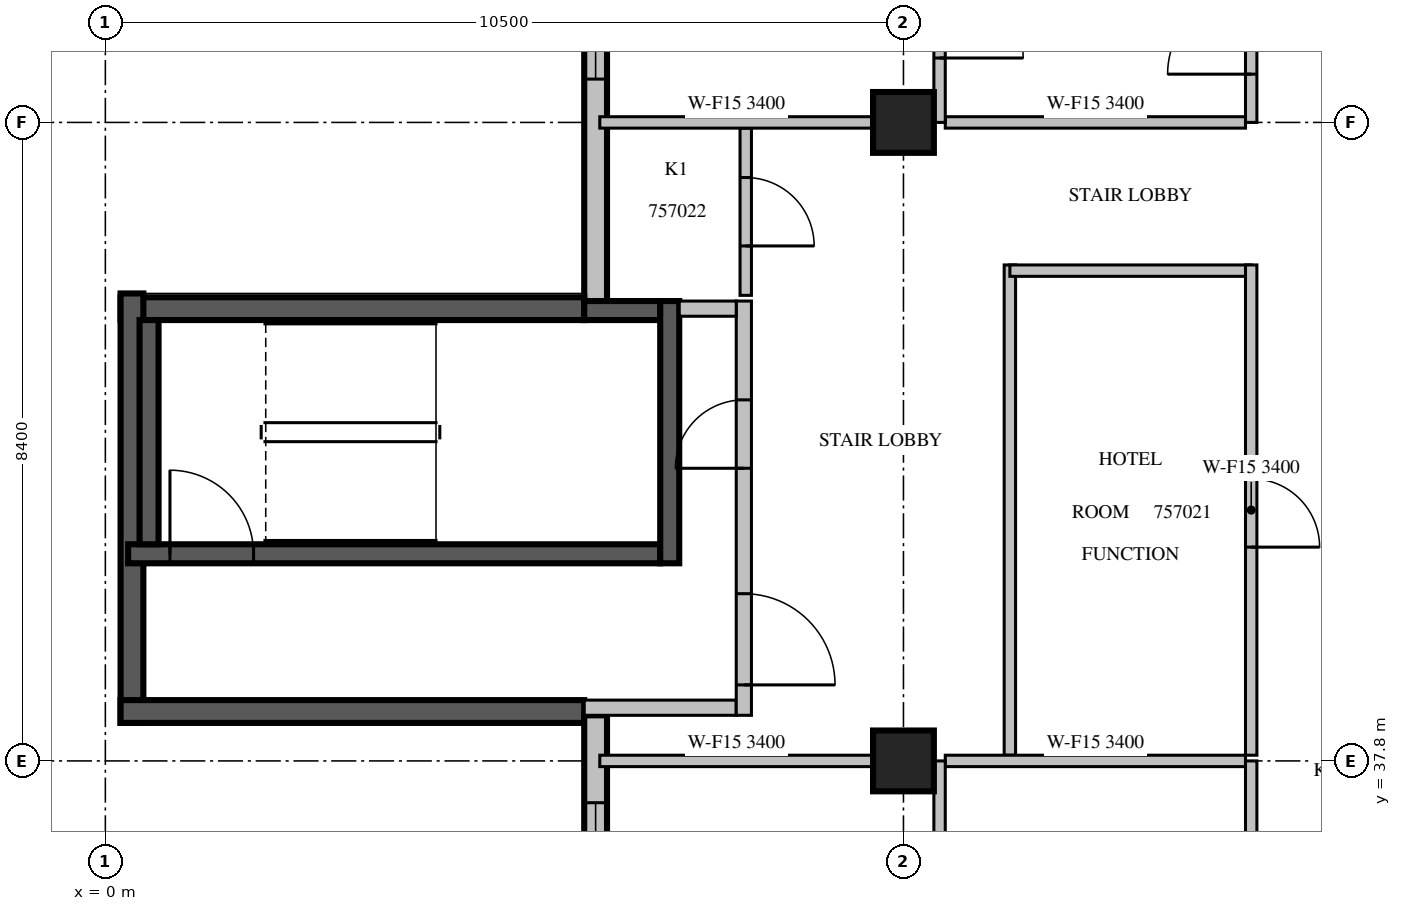
"""IFC4 building model, lengths in metres.
Left out: names, types, materials, properties, quantities, classifications, styles, units other than length and angle.
Written with IfcOpenShell. Run it as: python <this file> out.ifc"""

import sys

from ifc_helpers import new_model, si_unit, direction, frame, frame_2d, origin, origin_2d, place, context, subcontext, project, spatial, rectangle, extrude, source, transform, mapped, element, fill, save


model = new_model("IFC4")
c1 = context("Model", 3, precision=1e-05, world=origin(), true_north=direction((0.0, 1.0)))
c2 = subcontext(c1, "Body", "Model", "MODEL_VIEW")
j1 = project(units=[si_unit("LENGTHUNIT", "METRE"), si_unit("PLANEANGLEUNIT", "RADIAN")], contexts=[c1])
p1 = place(None, origin())
s1 = spatial("IfcSite", under=j1, at=p1, CompositionType="ELEMENT")
p2 = place(p1, origin())
s2 = spatial("IfcBuilding", under=s1, at=p2, CompositionType="ELEMENT")
p3 = place(p2, frame((0.0, 0.0, 250.0)))
s3 = spatial("IfcBuildingStorey", under=s2, at=p3, CompositionType="ELEMENT", Elevation=250.0)
m1 = source(origin(), c2, "Body", "SweptSolid", [
    extrude(rectangle(XDim=0.8, YDim=0.8, at=origin_2d()), origin(), (0.0, 0.0, 1.0), 3.8),
])
for number, where, z_axis, x_axis in (
    (1, (10.5, 37.8, 0.0), (0.0, 0.0, 1.0), (1.0, 0.0, 0.0)),
    (2, (10.5, 46.2, 0.0), (0.0, 0.0, 1.0), (1.0, 0.0, 0.0)),
):
    element("IfcColumn", number, at=place(p3, frame(where, z_axis=z_axis, x_axis=x_axis)), inside=s3, PredefinedType="COLUMN", context=c2, shape_type="MappedRepresentation", body=[
        mapped(m1, transform((0.0, 0.0, 0.0), scale=1.0)),
    ])
m2 = source(origin(), c2, "Body", "SweptSolid", [
    extrude(rectangle(XDim=9.91, YDim=0.3, at=frame_2d((4.955, 0.0))), origin(), (0.0, 0.0, 1.0), 3.4),
])
p4 = place(p3, frame((6.45, 53.76, 0.0), z_axis=(0.0, 0.0, 1.0), x_axis=(0.0, -1.0, 0.0)))
e3 = element("IfcWall", 3, at=p4, inside=s3, PredefinedType="STANDARD", context=c2, shape_type="MappedRepresentation", body=[
    mapped(m2, transform((0.0, 0.0, 0.0), scale=1.0)),
])
m3 = source(origin(), c2, "Body", "SweptSolid", [
    extrude(rectangle(XDim=3.6, YDim=2.3, at=frame_2d((1.8, 1.15))), frame((0.0, 0.16, 0.0), z_axis=(0.0, -1.0, 0.0), x_axis=(1.0, 0.0, 0.0)), (0.0, 0.0, 1.0), 0.32),
])
p5 = place(p4, frame((3.39, 0.0, 0.6)))
e4 = element("IfcOpeningElement", 4, at=p5, cuts=e3, PredefinedType="OPENING", context=c2, shape_type="MappedRepresentation", body=[
    mapped(m3, transform((0.0, 0.0, 0.0), scale=1.0)),
])
m4 = source(origin(), c2, "Body", "SweptSolid", [
    extrude(rectangle(XDim=2.4, YDim=2.3, at=frame_2d((1.2, 1.15))), frame((0.0, 0.16, 0.0), z_axis=(0.0, -1.0, 0.0), x_axis=(1.0, 0.0, 0.0)), (0.0, 0.0, 1.0), 0.32),
])
p6 = place(p4, frame((0.495, 0.0, 0.6)))
e5 = element("IfcOpeningElement", 5, at=p6, cuts=e3, PredefinedType="OPENING", context=c2, shape_type="MappedRepresentation", body=[
    mapped(m4, transform((0.0, 0.0, 0.0), scale=1.0)),
])
m5 = source(origin(), c2, "Body", "SweptSolid", [
    extrude(rectangle(XDim=6.1, YDim=0.3, at=frame_2d((3.05, 0.0))), origin(), (0.0, 0.0, 1.0), 3.4),
])
p7 = place(p3, frame((6.3, 43.75, 0.0), z_axis=(0.0, 0.0, 1.0), x_axis=(-1.0, 0.0, 0.0)))
e6 = element("IfcWall", 6, at=p7, inside=s3, PredefinedType="SOLIDWALL", context=c2, shape_type="MappedRepresentation", body=[
    mapped(m5, transform((0.0, 0.0, 0.0), scale=1.0)),
])
m6 = source(origin(), c2, "Body", "SweptSolid", [
    extrude(rectangle(XDim=5.65, YDim=0.3, at=frame_2d((2.825, 0.0))), origin(), (0.0, 0.0, 1.0), 3.4),
])
p8 = place(p3, frame((0.35, 43.95, 0.0), z_axis=(0.0, 0.0, 1.0), x_axis=(0.0, -1.0, 0.0)))
e7 = element("IfcWall", 7, at=p8, inside=s3, PredefinedType="SOLIDWALL", context=c2, shape_type="MappedRepresentation", body=[
    mapped(m6, transform((0.0, 0.0, 0.0), scale=1.0)),
])
p9 = place(p3, frame((0.2, 38.45, 0.0), z_axis=(0.0, 0.0, 1.0), x_axis=(1.0, 0.0, 0.0)))
e8 = element("IfcWall", 8, at=p9, inside=s3, PredefinedType="SOLIDWALL", context=c2, shape_type="MappedRepresentation", body=[
    mapped(m5, transform((0.0, 0.0, 0.0), scale=1.0)),
])
m7 = source(origin(), c2, "Body", "SweptSolid", [
    extrude(rectangle(XDim=16.6, YDim=0.3, at=frame_2d((8.3, 0.0))), origin(), (0.0, 0.0, 1.0), 2.9),
])
p10 = place(p3, frame((6.45, 38.4, 0.0), z_axis=(0.0, 0.0, 1.0), x_axis=(0.0, -1.0, 0.0)))
e9 = element("IfcWall", 9, at=p10, inside=s3, PredefinedType="STANDARD", context=c2, shape_type="MappedRepresentation", body=[
    mapped(m7, transform((0.0, 0.0, 0.0), scale=1.0)),
])
m8 = source(origin(), c2, "Body", "SweptSolid", [
    extrude(rectangle(XDim=1.8, YDim=2.3, at=frame_2d((0.9, 1.15))), frame((0.0, 0.16, 0.0), z_axis=(0.0, -1.0, 0.0), x_axis=(1.0, 0.0, 0.0)), (0.0, 0.0, 1.0), 0.32),
])
p11 = place(p10, frame((1.15, 0.0, 0.6)))
e10 = element("IfcOpeningElement", 10, at=p11, cuts=e9, PredefinedType="OPENING", context=c2, shape_type="MappedRepresentation", body=[
    mapped(m8, transform((0.0, 0.0, 0.0), scale=1.0)),
])
p12 = place(p10, frame((4.75, 0.0, 0.6)))
e11 = element("IfcOpeningElement", 11, at=p12, cuts=e9, PredefinedType="OPENING", context=c2, shape_type="MappedRepresentation", body=[
    mapped(m4, transform((0.0, 0.0, 0.0), scale=1.0)),
])
p13 = place(p10, frame((9.438, 0.0, 0.6)))
e12 = element("IfcOpeningElement", 12, at=p13, cuts=e9, PredefinedType="OPENING", context=c2, shape_type="MappedRepresentation", body=[
    mapped(m8, transform((0.0, 0.0, 0.0), scale=1.0)),
])
m9 = source(origin(), c2, "Body", "SweptSolid", [
    extrude(rectangle(XDim=3.0, YDim=2.3, at=frame_2d((1.5, 1.15))), frame((0.0, 0.16, 0.0), z_axis=(0.0, -1.0, 0.0), x_axis=(1.0, 0.0, 0.0)), (0.0, 0.0, 1.0), 0.32),
])
p14 = place(p10, frame((12.7, 0.0, 0.6)))
e13 = element("IfcOpeningElement", 13, at=p14, cuts=e9, PredefinedType="OPENING", context=c2, shape_type="MappedRepresentation", body=[
    mapped(m9, transform((0.0, 0.0, 0.0), scale=1.0)),
])
m10 = source(origin(), c2, "Body", "SweptSolid", [
    extrude(rectangle(XDim=7.0, YDim=0.25, at=frame_2d((3.5, 0.0))), origin(), (0.0, 0.0, 1.0), 3.4),
])
p15 = place(p3, frame((0.3, 40.525, 0.0), z_axis=(0.0, 0.0, 1.0), x_axis=(1.0, 0.0, 0.0)))
e14 = element("IfcWall", 14, at=p15, inside=s3, PredefinedType="SOLIDWALL", context=c2, shape_type="MappedRepresentation", body=[
    mapped(m10, transform((0.0, 0.0, 0.0), scale=1.0)),
])
m11 = source(origin(), c2, "Body", "SweptSolid", [
    extrude(rectangle(XDim=1.1, YDim=2.1, at=frame_2d((0.55, 1.05))), frame((0.0, 0.135, 0.0), z_axis=(0.0, -1.0, 0.0), x_axis=(1.0, 0.0, 0.0)), (0.0, 0.0, 1.0), 0.27),
])
p16 = place(p15, frame((0.55, 0.0, 0.0)))
e15 = element("IfcOpeningElement", 15, at=p16, cuts=e14, PredefinedType="OPENING", context=c2, shape_type="MappedRepresentation", body=[
    mapped(m11, transform((0.0, 0.0, 0.0), scale=1.0)),
])
m12 = source(origin(), c2, "Body", "SweptSolid", [
    extrude(rectangle(XDim=1.0, YDim=0.25, at=frame_2d((0.5, 0.0))), origin(), (0.0, 0.0, 1.0), 3.4),
])
p17 = place(p3, frame((6.3, 43.725, 0.0), z_axis=(0.0, 0.0, 1.0), x_axis=(1.0, 0.0, 0.0)))
e16 = element("IfcWall", 16, at=p17, inside=s3, PredefinedType="SOLIDWALL", context=c2, shape_type="MappedRepresentation", body=[
    mapped(m12, transform((0.0, 0.0, 0.0), scale=1.0)),
])
m13 = source(origin(), c2, "Body", "SweptSolid", [
    extrude(rectangle(XDim=3.45, YDim=0.25, at=frame_2d((1.725, 0.0))), origin(), (0.0, 0.0, 1.0), 3.4),
])
p18 = place(p3, frame((7.425, 40.4, 0.0), z_axis=(0.0, 0.0, 1.0), x_axis=(0.0, 1.0, 0.0)))
e17 = element("IfcWall", 17, at=p18, inside=s3, PredefinedType="SOLIDWALL", context=c2, shape_type="MappedRepresentation", body=[
    mapped(m13, transform((0.0, 0.0, 0.0), scale=1.0)),
])
m14 = source(origin(), c2, "Body", "SweptSolid", [
    extrude(rectangle(XDim=2.95, YDim=0.25, at=frame_2d((1.475, 0.0))), origin(), (0.0, 0.0, 1.0), 3.4),
])
p19 = place(p3, frame((0.575, 40.65, 0.0), z_axis=(0.0, 0.0, 1.0), x_axis=(0.0, 1.0, 0.0)))
e18 = element("IfcWall", 18, at=p19, inside=s3, PredefinedType="SOLIDWALL", context=c2, shape_type="MappedRepresentation", body=[
    mapped(m14, transform((0.0, 0.0, 0.0), scale=1.0)),
])
m15 = source(origin(), c2, "Body", "SweptSolid", [
    extrude(rectangle(XDim=2.0, YDim=0.2, at=frame_2d((1.0, 0.0))), origin(), (0.0, 0.0, 1.0), 3.4),
])
p20 = place(p3, frame((6.3, 38.5, 0.0), z_axis=(0.0, 0.0, 1.0), x_axis=(1.0, 0.0, 0.0)))
e19 = element("IfcWall", 19, at=p20, inside=s3, PredefinedType="PARTITIONING", context=c2, shape_type="MappedRepresentation", body=[
    mapped(m15, transform((0.0, 0.0, 0.0), scale=1.0)),
])
m16 = source(origin(), c2, "Body", "SweptSolid", [
    extrude(rectangle(XDim=5.45, YDim=0.2, at=frame_2d((2.725, 0.0))), origin(), (0.0, 0.0, 1.0), 3.4),
])
p21 = place(p3, frame((8.4, 38.4, 0.0), z_axis=(0.0, 0.0, 1.0), x_axis=(0.0, 1.0, 0.0)))
e20 = element("IfcWall", 20, at=p21, inside=s3, PredefinedType="PARTITIONING", context=c2, shape_type="MappedRepresentation", body=[
    mapped(m16, transform((0.0, 0.0, 0.0), scale=1.0)),
])
m17 = source(origin(), c2, "Body", "SweptSolid", [
    extrude(rectangle(XDim=1.2, YDim=2.1, at=frame_2d((0.6, 1.05))), frame((0.0, 0.11, 0.0), z_axis=(0.0, -1.0, 0.0), x_axis=(1.0, 0.0, 0.0)), (0.0, 0.0, 1.0), 0.22),
])
p22 = place(p21, frame((0.4, 0.0, 0.0)))
e21 = element("IfcOpeningElement", 21, at=p22, cuts=e20, PredefinedType="OPENING", context=c2, shape_type="MappedRepresentation", body=[
    mapped(m17, transform((0.0, 0.0, 0.0), scale=1.0)),
])
m18 = source(origin(), c2, "Body", "SweptSolid", [
    extrude(rectangle(XDim=0.9, YDim=2.1, at=frame_2d((0.45, 1.05))), frame((0.0, 0.11, 0.0), z_axis=(0.0, -1.0, 0.0), x_axis=(1.0, 0.0, 0.0)), (0.0, 0.0, 1.0), 0.22),
])
p23 = place(p21, frame((3.25, 0.0, 0.0)))
e22 = element("IfcOpeningElement", 22, at=p23, cuts=e20, PredefinedType="OPENING", context=c2, shape_type="MappedRepresentation", body=[
    mapped(m18, transform((0.0, 0.0, 0.0), scale=1.0)),
])
m19 = source(origin(), c2, "Body", "SweptSolid", [
    extrude(rectangle(XDim=0.75, YDim=0.2, at=frame_2d((0.375, 0.0))), origin(), (0.0, 0.0, 1.0), 3.4),
])
p24 = place(p3, frame((7.55, 43.75, 0.0), z_axis=(0.0, 0.0, 1.0), x_axis=(1.0, 0.0, 0.0)))
e23 = element("IfcWall", 23, at=p24, inside=s3, PredefinedType="PARTITIONING", context=c2, shape_type="MappedRepresentation", body=[
    mapped(m19, transform((0.0, 0.0, 0.0), scale=1.0)),
])
m20 = source(origin(), c2, "Body", "SweptSolid", [
    extrude(rectangle(XDim=6.45, YDim=0.15, at=frame_2d((3.225, 0.0))), origin(), (0.0, 0.0, 1.0), 3.4),
])
p25 = place(p3, frame((11.9, 44.325, 0.0), z_axis=(0.0, 0.0, 1.0), x_axis=(0.0, -1.0, 0.0)))
e24 = element("IfcWall", 24, at=p25, inside=s3, PredefinedType="PARTITIONING", context=c2, shape_type="MappedRepresentation", body=[
    mapped(m20, transform((0.0, 0.0, 0.0), scale=1.0)),
])
m21 = source(origin(), c2, "Body", "SweptSolid", [
    extrude(rectangle(XDim=3.175, YDim=0.15, at=frame_2d((1.587, 0.0))), origin(), (0.0, 0.0, 1.0), 3.4),
])
p26 = place(p3, frame((15.075, 44.25, 0.0), z_axis=(0.0, 0.0, 1.0), x_axis=(-1.0, 0.0, 0.0)))
e25 = element("IfcWall", 25, at=p26, inside=s3, PredefinedType="PARTITIONING", context=c2, shape_type="MappedRepresentation", body=[
    mapped(m21, transform((0.0, 0.0, 0.0), scale=1.0)),
])
p27 = place(p3, frame((15.075, 37.875, 0.0), z_axis=(0.0, 0.0, 1.0), x_axis=(0.0, 1.0, 0.0)))
e26 = element("IfcWall", 26, at=p27, inside=s3, PredefinedType="PARTITIONING", context=c2, shape_type="MappedRepresentation", body=[
    mapped(m20, transform((0.0, 0.0, 0.0), scale=1.0)),
])
m22 = source(origin(), c2, "Body", "SweptSolid", [
    extrude(rectangle(XDim=0.9, YDim=2.1, at=frame_2d((0.45, 1.05))), frame((0.0, 0.085, 0.0), z_axis=(0.0, -1.0, 0.0), x_axis=(1.0, 0.0, 0.0)), (0.0, 0.0, 1.0), 0.17),
])
p28 = place(p27, frame((2.737, 0.0, 0.0)))
e27 = element("IfcOpeningElement", 27, at=p28, cuts=e26, PredefinedType="OPENING", context=c2, shape_type="MappedRepresentation", body=[
    mapped(m22, transform((0.0, 0.0, 0.0), scale=1.0)),
])
m23 = source(origin(), c2, "Body", "SweptSolid", [
    extrude(rectangle(XDim=2.2, YDim=0.15, at=frame_2d((1.1, 0.0))), origin(), (0.0, 0.0, 1.0), 3.4),
])
p29 = place(p3, frame((8.425, 43.925, 0.0), z_axis=(0.0, 0.0, 1.0), x_axis=(0.0, 1.0, 0.0)))
e28 = element("IfcWall", 28, at=p29, inside=s3, PredefinedType="PARTITIONING", context=c2, shape_type="MappedRepresentation", body=[
    mapped(m23, transform((0.0, 0.0, 0.0), scale=1.0)),
])
p30 = place(p29, frame((0.65, 0.0, 0.0)))
e29 = element("IfcOpeningElement", 29, at=p30, cuts=e28, PredefinedType="OPENING", context=c2, shape_type="MappedRepresentation", body=[
    mapped(m22, transform((0.0, 0.0, 0.0), scale=1.0)),
])
m24 = source(origin(), c2, "Body", "SweptSolid", [
    extrude(rectangle(XDim=3.596, YDim=0.15, at=frame_2d((1.798, 0.0))), origin(), (0.0, 0.0, 1.0), 3.4),
])
p31 = place(p3, frame((10.101, 37.8, 0.0), z_axis=(0.0, 0.0, 1.0), x_axis=(-1.0, 0.0, 0.0)))
e30 = element("IfcWall", 30, at=p31, inside=s3, PredefinedType="PARTITIONING", context=c2, shape_type="MappedRepresentation", body=[
    mapped(m24, transform((0.0, 0.0, 0.0), scale=1.0)),
])
m25 = source(origin(), c2, "Body", "SweptSolid", [
    extrude(rectangle(XDim=3.95, YDim=0.15, at=frame_2d((1.975, 0.0))), origin(), (0.0, 0.0, 1.0), 3.4),
])
p32 = place(p3, frame((15.0, 37.8, 0.0), z_axis=(0.0, 0.0, 1.0), x_axis=(-1.0, 0.0, 0.0)))
e31 = element("IfcWall", 31, at=p32, inside=s3, PredefinedType="PARTITIONING", context=c2, shape_type="MappedRepresentation", body=[
    mapped(m25, transform((0.0, 0.0, 0.0), scale=1.0)),
])
m26 = source(origin(), c2, "Body", "SweptSolid", [
    extrude(rectangle(XDim=8.4, YDim=0.15, at=frame_2d((4.2, 0.0))), origin(), (0.0, 0.0, 1.0), 2.9),
])
p33 = place(p3, frame((10.975, 29.4, 0.0), z_axis=(0.0, 0.0, 1.0), x_axis=(0.0, 1.0, 0.0)))
e32 = element("IfcWall", 32, at=p33, inside=s3, PredefinedType="PARTITIONING", context=c2, shape_type="MappedRepresentation", body=[
    mapped(m26, transform((0.0, 0.0, 0.0), scale=1.0)),
])
p34 = place(p33, frame((0.408, 0.0, 0.0)))
e33 = element("IfcOpeningElement", 33, at=p34, cuts=e32, PredefinedType="OPENING", context=c2, shape_type="MappedRepresentation", body=[
    mapped(m22, transform((0.0, 0.0, 0.0), scale=1.0)),
])
p35 = place(p33, frame((2.328, 0.0, 0.0)))
e34 = element("IfcOpeningElement", 34, at=p35, cuts=e32, PredefinedType="OPENING", context=c2, shape_type="MappedRepresentation", body=[
    mapped(m22, transform((0.0, 0.0, 0.0), scale=1.0)),
])
p36 = place(p3, frame((10.101, 46.2, 0.0), z_axis=(0.0, 0.0, 1.0), x_axis=(-1.0, 0.0, 0.0)))
e35 = element("IfcWall", 35, at=p36, inside=s3, PredefinedType="PARTITIONING", context=c2, shape_type="MappedRepresentation", body=[
    mapped(m24, transform((0.0, 0.0, 0.0), scale=1.0)),
])
p37 = place(p3, frame((15.0, 46.2, 0.0), z_axis=(0.0, 0.0, 1.0), x_axis=(-1.0, 0.0, 0.0)))
e36 = element("IfcWall", 36, at=p37, inside=s3, PredefinedType="PARTITIONING", context=c2, shape_type="MappedRepresentation", body=[
    mapped(m25, transform((0.0, 0.0, 0.0), scale=1.0)),
])
m27 = source(origin(), c2, "Body", "SweptSolid", [
    extrude(rectangle(XDim=7.26, YDim=0.15, at=frame_2d((3.63, 0.0))), origin(), (0.0, 0.0, 1.0), 3.4),
])
p38 = place(p3, frame((10.975, 46.2, 0.0), z_axis=(0.0, 0.0, 1.0), x_axis=(0.0, 1.0, 0.0)))
e37 = element("IfcWall", 37, at=p38, inside=s3, PredefinedType="PARTITIONING", context=c2, shape_type="MappedRepresentation", body=[
    mapped(m27, transform((0.0, 0.0, 0.0), scale=1.0)),
])
m28 = source(origin(), c2, "Body", "SweptSolid", [
    extrude(rectangle(XDim=1.1, YDim=2.1, at=frame_2d((0.55, 1.05))), frame((0.0, 0.085, 0.0), z_axis=(0.0, -1.0, 0.0), x_axis=(1.0, 0.0, 0.0)), (0.0, 0.0, 1.0), 0.17),
])
p39 = place(p38, frame((0.847, 0.0, 0.0)))
e38 = element("IfcOpeningElement", 38, at=p39, cuts=e37, PredefinedType="OPENING", context=c2, shape_type="MappedRepresentation", body=[
    mapped(m28, transform((0.0, 0.0, 0.0), scale=1.0)),
])
p40 = place(p38, frame((2.946, 0.0, 0.0)))
e39 = element("IfcOpeningElement", 39, at=p40, cuts=e37, PredefinedType="OPENING", context=c2, shape_type="MappedRepresentation", body=[
    mapped(m22, transform((0.0, 0.0, 0.0), scale=1.0)),
])
p41 = place(p38, frame((4.529, 0.0, 0.0)))
e40 = element("IfcOpeningElement", 40, at=p41, cuts=e37, PredefinedType="OPENING", context=c2, shape_type="MappedRepresentation", body=[
    mapped(m22, transform((0.0, 0.0, 0.0), scale=1.0)),
])
p42 = place(p3, frame((15.075, 29.4, 0.0), z_axis=(0.0, 0.0, 1.0), x_axis=(0.0, 1.0, 0.0)))
e41 = element("IfcWall", 41, at=p42, inside=s3, PredefinedType="PARTITIONING", context=c2, shape_type="MappedRepresentation", body=[
    mapped(m26, transform((0.0, 0.0, 0.0), scale=1.0)),
])
m29 = source(origin(), c2, "Body", "SweptSolid", [
    extrude(rectangle(XDim=1.0, YDim=2.1, at=frame_2d((0.5, 1.05))), frame((0.0, 0.085, 0.0), z_axis=(0.0, -1.0, 0.0), x_axis=(1.0, 0.0, 0.0)), (0.0, 0.0, 1.0), 0.17),
])
p43 = place(p42, frame((0.245, 0.0, 0.0)))
e42 = element("IfcOpeningElement", 42, at=p43, cuts=e41, PredefinedType="OPENING", context=c2, shape_type="MappedRepresentation", body=[
    mapped(m29, transform((0.0, 0.0, 0.0), scale=1.0)),
])
p44 = place(p42, frame((5.733, 0.0, 0.0)))
e43 = element("IfcOpeningElement", 43, at=p44, cuts=e41, PredefinedType="OPENING", context=c2, shape_type="MappedRepresentation", body=[
    mapped(m22, transform((0.0, 0.0, 0.0), scale=1.0)),
])
p45 = place(p3, frame((15.075, 46.2, 0.0), z_axis=(0.0, 0.0, 1.0), x_axis=(0.0, 1.0, 0.0)))
e44 = element("IfcWall", 44, at=p45, inside=s3, PredefinedType="PARTITIONING", context=c2, shape_type="MappedRepresentation", body=[
    mapped(m27, transform((0.0, 0.0, 0.0), scale=1.0)),
])
p46 = place(p45, frame((0.635, 0.0, 0.0)))
e45 = element("IfcOpeningElement", 45, at=p46, cuts=e44, PredefinedType="OPENING", context=c2, shape_type="MappedRepresentation", body=[
    mapped(m28, transform((0.0, 0.0, 0.0), scale=1.0)),
])
m30 = source(origin(), c2, "Body", "SweptSolid", [
    extrude(rectangle(XDim=3.6, YDim=2.3, at=frame_2d((1.8, 1.15))), frame((0.0, 0.03, 0.0), z_axis=(0.0, -1.0, 0.0), x_axis=(1.0, 0.0, 0.0)), (0.0, 0.0, 1.0), 0.06),
])
p47 = place(p5, origin())
e46 = element("IfcWindow", 46, at=p47, inside=s3, PartitioningType="SINGLE_PANEL", PredefinedType="WINDOW", context=c2, shape_type="MappedRepresentation", body=[
    mapped(m30, transform((0.0, 0.0, 0.0), scale=1.0)),
])
fill(e4, e46)
m31 = source(origin(), c2, "Body", "SweptSolid", [
    extrude(rectangle(XDim=1.8, YDim=2.3, at=frame_2d((0.9, 1.15))), frame((0.0, 0.03, 0.0), z_axis=(0.0, -1.0, 0.0), x_axis=(1.0, 0.0, 0.0)), (0.0, 0.0, 1.0), 0.06),
])
p48 = place(p11, origin())
e47 = element("IfcWindow", 47, at=p48, inside=s3, PartitioningType="SINGLE_PANEL", PredefinedType="WINDOW", context=c2, shape_type="MappedRepresentation", body=[
    mapped(m31, transform((0.0, 0.0, 0.0), scale=1.0)),
])
fill(e10, e47)
m32 = source(origin(), c2, "Body", "SweptSolid", [
    extrude(rectangle(XDim=1.1, YDim=2.1, at=frame_2d((0.55, 1.05))), frame((0.0, 0.025, 0.0), z_axis=(0.0, -1.0, 0.0), x_axis=(1.0, 0.0, 0.0)), (0.0, 0.0, 1.0), 0.05),
])
p49 = place(p16, origin())
e48 = element("IfcDoor", 48, at=p49, inside=s3, OperationType="SINGLE_SWING_LEFT", PredefinedType="DOOR", context=c2, shape_type="MappedRepresentation", body=[
    mapped(m32, transform((0.0, 0.0, 0.0), scale=1.0)),
])
fill(e15, e48)
m33 = source(origin(), c2, "Body", "SweptSolid", [
    extrude(rectangle(XDim=1.2, YDim=2.1, at=frame_2d((0.6, 1.05))), frame((0.0, 0.025, 0.0), z_axis=(0.0, -1.0, 0.0), x_axis=(1.0, 0.0, 0.0)), (0.0, 0.0, 1.0), 0.05),
])
p50 = place(p22, origin())
e49 = element("IfcDoor", 49, at=p50, inside=s3, OperationType="SINGLE_SWING_RIGHT", PredefinedType="DOOR", context=c2, shape_type="MappedRepresentation", body=[
    mapped(m33, transform((0.0, 0.0, 0.0), scale=1.0)),
])
fill(e21, e49)
m34 = source(origin(), c2, "Body", "SweptSolid", [
    extrude(rectangle(XDim=0.9, YDim=2.1, at=frame_2d((0.45, 1.05))), frame((0.0, 0.025, 0.0), z_axis=(0.0, -1.0, 0.0), x_axis=(1.0, 0.0, 0.0)), (0.0, 0.0, 1.0), 0.05),
])
p51 = place(p23, origin())
e50 = element("IfcDoor", 50, at=p51, inside=s3, OperationType="SINGLE_SWING_LEFT", PredefinedType="DOOR", context=c2, shape_type="MappedRepresentation", body=[
    mapped(m34, transform((0.0, 0.0, 0.0), scale=1.0)),
])
fill(e22, e50)
p52 = place(p28, origin())
e51 = element("IfcDoor", 51, at=p52, inside=s3, OperationType="SINGLE_SWING_RIGHT", PredefinedType="DOOR", context=c2, shape_type="MappedRepresentation", body=[
    mapped(m34, transform((0.0, 0.0, 0.0), scale=1.0)),
])
fill(e27, e51)
p53 = place(p30, origin())
e52 = element("IfcDoor", 52, at=p53, inside=s3, OperationType="SINGLE_SWING_RIGHT", PredefinedType="DOOR", context=c2, shape_type="MappedRepresentation", body=[
    mapped(m34, transform((0.0, 0.0, 0.0), scale=1.0)),
])
fill(e29, e52)
p54 = place(p46, origin())
e53 = element("IfcDoor", 53, at=p54, inside=s3, OperationType="SINGLE_SWING_LEFT", PredefinedType="DOOR", context=c2, shape_type="MappedRepresentation", body=[
    mapped(m32, transform((0.0, 0.0, 0.0), scale=1.0)),
])
fill(e45, e53)
p55 = place(p39, origin())
e54 = element("IfcDoor", 54, at=p55, inside=s3, OperationType="SINGLE_SWING_RIGHT", PredefinedType="DOOR", context=c2, shape_type="MappedRepresentation", body=[
    mapped(m32, transform((0.0, 0.0, 0.0), scale=1.0)),
])
fill(e38, e54)
save(model, sys.argv[1])
